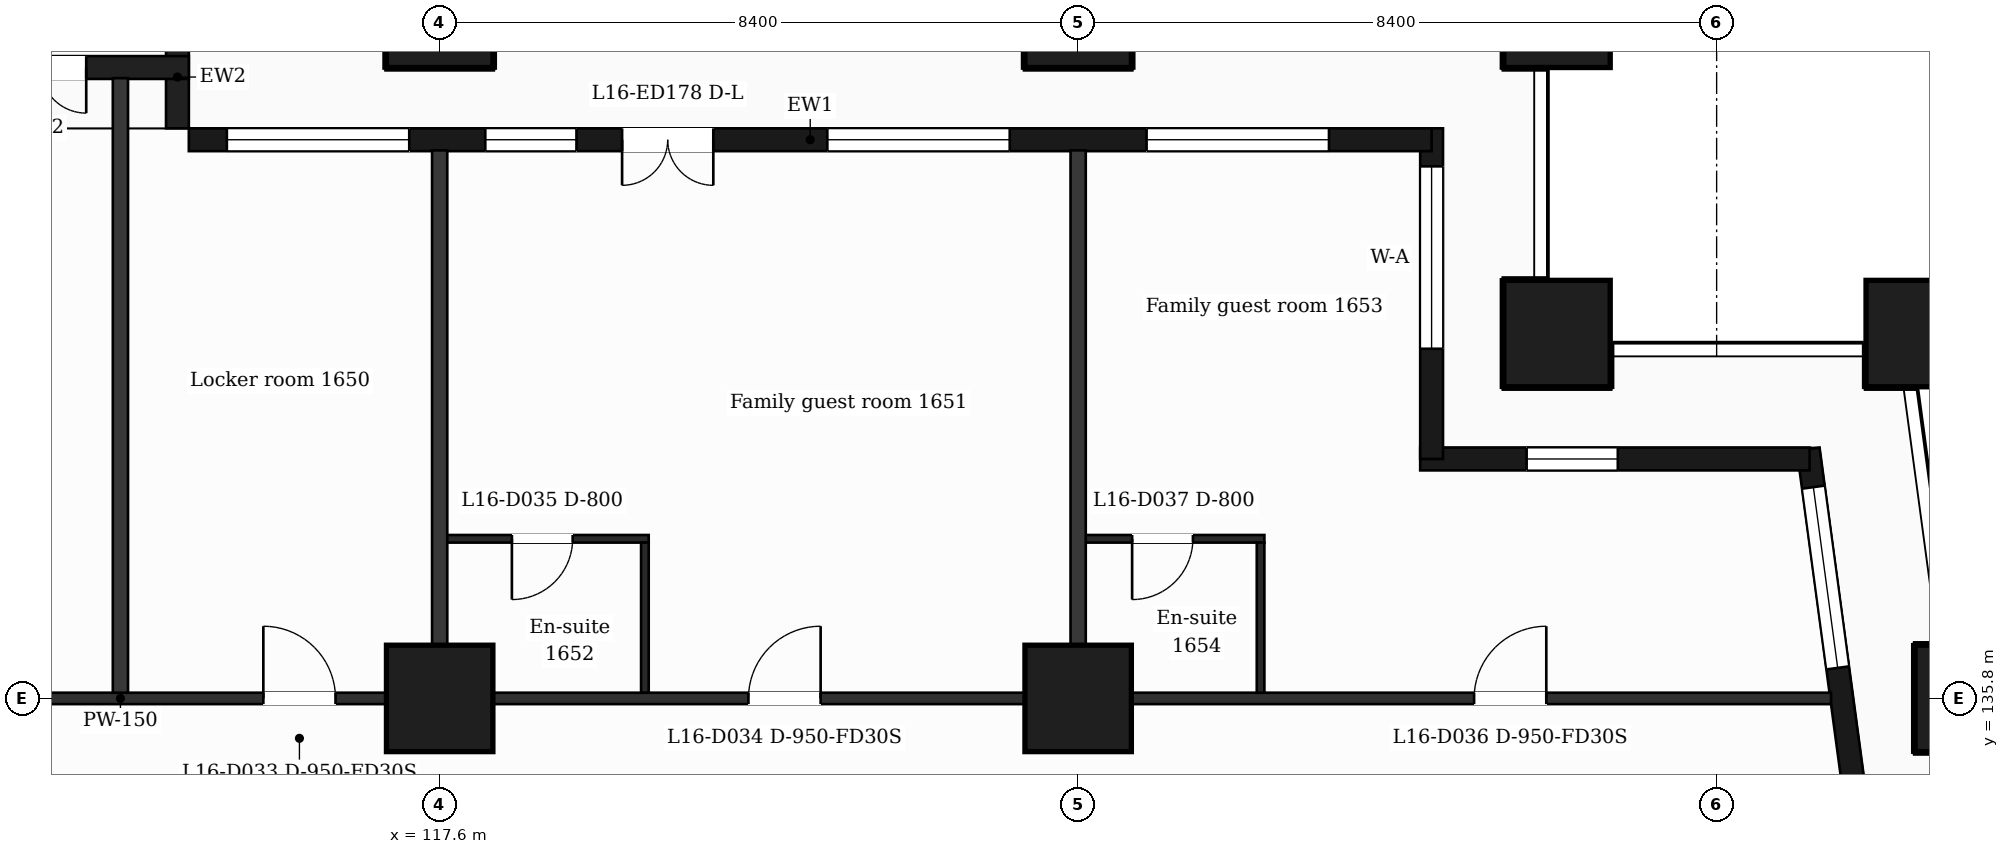
"""IFC4 building model, lengths in metres.
Left out: names, types, materials, properties, quantities, classifications, styles, units other than length and angle.
Written with IfcOpenShell. Run it as: python <this file> out.ifc"""

import sys

from ifc_helpers import new_model, si_unit, direction, frame, frame_2d, origin, origin_2d, place, context, subcontext, project, spatial, rectangle, extrude, element, fill, save


model = new_model("IFC4")
c1 = context("Model", 3, precision=1e-05, world=origin(), true_north=direction((0.0, 1.0)))
c2 = subcontext(c1, "Body", "Model", "MODEL_VIEW")
j1 = project(units=[si_unit("LENGTHUNIT", "METRE"), si_unit("PLANEANGLEUNIT", "RADIAN")], contexts=[c1])
p1 = place(None, origin())
s1 = spatial("IfcSite", under=j1, at=p1, CompositionType="ELEMENT")
p2 = place(p1, origin())
s2 = spatial("IfcBuilding", under=s1, at=p2, CompositionType="ELEMENT")
p3 = place(p2, frame((0.0, 0.0, 74.0)))
s3 = spatial("IfcBuildingStorey", under=s2, at=p3, CompositionType="ELEMENT", Elevation=74.0)
for number, where, z_axis, x_axis in (
    (1, (132.3, 140.6, 0.0), (0.0, 0.0, 1.0), (1.0, 0.0, 0.0)),
    (2, (137.065, 140.6, 0.0), (0.0, 0.0, 1.0), (1.0, 0.0, 0.0)),
    (3, (117.6, 135.8, 0.0), (0.0, 0.0, 1.0), (1.0, 0.0, 0.0)),
    (4, (126.0, 135.8, 0.0), (0.0, 0.0, 1.0), (1.0, 0.0, 0.0)),
    (5, (137.711, 135.8, 0.0), (0.0, 0.0, 1.0), (1.0, 0.0, 0.0)),
    (6, (117.6, 144.8, 0.0), (0.0, 0.0, 1.0), (1.0, 0.0, 0.0)),
    (7, (126.0, 144.8, 0.0), (0.0, 0.0, 1.0), (1.0, 0.0, 0.0)),
    (8, (132.3, 144.8, 0.0), (0.0, 0.0, 1.0), (1.0, 0.0, 0.0)),
):
    element("IfcColumn", number, at=place(p3, frame(where, z_axis=z_axis, x_axis=x_axis)), inside=s3, PredefinedType="COLUMN", context=c2, shape_type="SweptSolid", body=[
        extrude(rectangle(XDim=1.4, YDim=1.4, at=origin_2d()), origin(), (0.0, 0.0, 1.0), 3.5),
    ])
p4 = place(p3, frame((136.504, 132.4, 0.0), z_axis=(0.0, 0.0, 1.0), x_axis=(-0.133399697462, 0.99106231929, 0.0)))
e9 = element("IfcWall", 9, at=p4, inside=s3, PredefinedType="SOLIDWALL", context=c2, shape_type="SweptSolid", body=[
    extrude(rectangle(XDim=6.74, YDim=0.3, at=frame_2d((3.37, 0.0))), origin(), (0.0, 0.0, 1.0), 3.18),
])
p5 = place(p4, frame((1.115, 0.0, 0.0)))
e10 = element("IfcOpeningElement", 10, at=p5, cuts=e9, PredefinedType="OPENING", context=c2, shape_type="SweptSolid", body=[
    extrude(rectangle(XDim=1.2, YDim=2.4, at=frame_2d((0.6, 1.2))), frame((0.0, 0.16, 0.0), z_axis=(0.0, -1.0, 0.0), x_axis=(1.0, 0.0, 0.0)), (0.0, 0.0, 1.0), 0.32),
])
p6 = place(p4, frame((3.835, 0.0, 0.9)))
e11 = element("IfcOpeningElement", 11, at=p6, cuts=e9, PredefinedType="OPENING", context=c2, shape_type="SweptSolid", body=[
    extrude(rectangle(XDim=2.4, YDim=2.1, at=frame_2d((1.2, 1.05))), frame((0.0, 0.16, 0.0), z_axis=(0.0, -1.0, 0.0), x_axis=(1.0, 0.0, 0.0)), (0.0, 0.0, 1.0), 0.32),
])
p7 = place(p3, frame((135.623, 138.95, 0.0), z_axis=(0.0, 0.0, 1.0), x_axis=(-1.0, 0.0, 0.0)))
e12 = element("IfcWall", 12, at=p7, inside=s3, PredefinedType="SOLIDWALL", context=c2, shape_type="SweptSolid", body=[
    extrude(rectangle(XDim=5.123, YDim=0.3, at=frame_2d((2.561, 0.0))), origin(), (0.0, 0.0, 1.0), 3.18),
])
p8 = place(p7, frame((2.523, 0.0, 0.9)))
e13 = element("IfcOpeningElement", 13, at=p8, cuts=e12, PredefinedType="OPENING", context=c2, shape_type="SweptSolid", body=[
    extrude(rectangle(XDim=1.2, YDim=2.1, at=frame_2d((0.6, 1.05))), frame((0.0, 0.16, 0.0), z_axis=(0.0, -1.0, 0.0), x_axis=(1.0, 0.0, 0.0)), (0.0, 0.0, 1.0), 0.32),
])
p9 = place(p3, frame((130.65, 138.95, 0.0), z_axis=(0.0, 0.0, 1.0), x_axis=(0.0, 1.0, 0.0)))
e14 = element("IfcWall", 14, at=p9, inside=s3, PredefinedType="SOLIDWALL", context=c2, shape_type="SweptSolid", body=[
    extrude(rectangle(XDim=4.35, YDim=0.3, at=frame_2d((2.175, 0.0))), origin(), (0.0, 0.0, 1.0), 3.18),
])
p10 = place(p9, frame((1.45, 0.0, 0.9)))
e15 = element("IfcOpeningElement", 15, at=p10, cuts=e14, PredefinedType="OPENING", context=c2, shape_type="SweptSolid", body=[
    extrude(rectangle(XDim=2.4, YDim=2.1, at=frame_2d((1.2, 1.05))), frame((0.0, 0.16, 0.0), z_axis=(0.0, -1.0, 0.0), x_axis=(1.0, 0.0, 0.0)), (0.0, 0.0, 1.0), 0.32),
])
p11 = place(p3, frame((130.65, 143.15, 0.0), z_axis=(0.0, 0.0, 1.0), x_axis=(-1.0, 0.0, 0.0)))
e16 = element("IfcWall", 16, at=p11, inside=s3, PredefinedType="SOLIDWALL", context=c2, shape_type="SweptSolid", body=[
    extrude(rectangle(XDim=16.35, YDim=0.3, at=frame_2d((8.175, 0.0))), origin(), (0.0, 0.0, 1.0), 3.18),
])
p12 = place(p11, frame((1.35, 0.0, 0.9)))
e17 = element("IfcOpeningElement", 17, at=p12, cuts=e16, PredefinedType="OPENING", context=c2, shape_type="SweptSolid", body=[
    extrude(rectangle(XDim=2.4, YDim=2.1, at=frame_2d((1.2, 1.05))), frame((0.0, 0.16, 0.0), z_axis=(0.0, -1.0, 0.0), x_axis=(1.0, 0.0, 0.0)), (0.0, 0.0, 1.0), 0.32),
])
p13 = place(p11, frame((5.55, 0.0, 0.9)))
e18 = element("IfcOpeningElement", 18, at=p13, cuts=e16, PredefinedType="OPENING", context=c2, shape_type="SweptSolid", body=[
    extrude(rectangle(XDim=2.4, YDim=2.1, at=frame_2d((1.2, 1.05))), frame((0.0, 0.16, 0.0), z_axis=(0.0, -1.0, 0.0), x_axis=(1.0, 0.0, 0.0)), (0.0, 0.0, 1.0), 0.32),
])
p14 = place(p11, frame((9.45, 0.0, 0.0)))
e19 = element("IfcOpeningElement", 19, at=p14, cuts=e16, PredefinedType="OPENING", context=c2, shape_type="SweptSolid", body=[
    extrude(rectangle(XDim=1.2, YDim=2.4, at=frame_2d((0.6, 1.2))), frame((0.0, 0.16, 0.0), z_axis=(0.0, -1.0, 0.0), x_axis=(1.0, 0.0, 0.0)), (0.0, 0.0, 1.0), 0.32),
])
p15 = place(p11, frame((11.25, 0.0, 0.9)))
e20 = element("IfcOpeningElement", 20, at=p15, cuts=e16, PredefinedType="OPENING", context=c2, shape_type="SweptSolid", body=[
    extrude(rectangle(XDim=1.2, YDim=2.1, at=frame_2d((0.6, 1.05))), frame((0.0, 0.16, 0.0), z_axis=(0.0, -1.0, 0.0), x_axis=(1.0, 0.0, 0.0)), (0.0, 0.0, 1.0), 0.32),
])
p16 = place(p11, frame((13.45, 0.0, 0.9)))
e21 = element("IfcOpeningElement", 21, at=p16, cuts=e16, PredefinedType="OPENING", context=c2, shape_type="SweptSolid", body=[
    extrude(rectangle(XDim=2.4, YDim=2.1, at=frame_2d((1.2, 1.05))), frame((0.0, 0.16, 0.0), z_axis=(0.0, -1.0, 0.0), x_axis=(1.0, 0.0, 0.0)), (0.0, 0.0, 1.0), 0.32),
])
p17 = place(p3, frame((114.15, 143.3, 0.0), z_axis=(0.0, 0.0, 1.0), x_axis=(0.0, 1.0, 0.0)))
e22 = element("IfcWall", 22, at=p17, inside=s3, PredefinedType="SOLIDWALL", context=c2, shape_type="SweptSolid", body=[
    extrude(rectangle(XDim=1.35, YDim=0.3, at=frame_2d((0.675, 0.0))), origin(), (0.0, 0.0, 1.0), 3.18),
])
p18 = place(p3, frame((114.3, 144.1, 0.0), z_axis=(0.0, 0.0, 1.0), x_axis=(-1.0, 0.0, 0.0)))
e23 = element("IfcWall", 23, at=p18, inside=s3, PredefinedType="SOLIDWALL", context=c2, shape_type="SweptSolid", body=[
    extrude(rectangle(XDim=3.9, YDim=0.3, at=frame_2d((1.95, 0.0))), origin(), (0.0, 0.0, 1.0), 3.18),
])
p19 = place(p18, frame((1.35, 0.0, 0.0)))
e24 = element("IfcOpeningElement", 24, at=p19, cuts=e23, PredefinedType="OPENING", context=c2, shape_type="SweptSolid", body=[
    extrude(rectangle(XDim=1.2, YDim=2.4, at=frame_2d((0.6, 1.2))), frame((0.0, 0.16, 0.0), z_axis=(0.0, -1.0, 0.0), x_axis=(1.0, 0.0, 0.0)), (0.0, 0.0, 1.0), 0.32),
])
p20 = place(p3, frame((90.895, 135.8, 0.0), z_axis=(0.0, 0.0, 1.0), x_axis=(1.0, 0.0, 0.0)))
e25 = element("IfcWall", 25, at=p20, inside=s3, PredefinedType="PARTITIONING", context=c2, shape_type="SweptSolid", body=[
    extrude(rectangle(XDim=45.011, YDim=0.15, at=frame_2d((22.505, 0.0))), origin(), (0.0, 0.0, 1.0), 3.18),
])
p21 = place(p20, frame((7.068, 0.0, 0.0)))
e26 = element("IfcOpeningElement", 26, at=p21, cuts=e25, PredefinedType="OPENING", context=c2, shape_type="SweptSolid", body=[
    extrude(rectangle(XDim=0.95, YDim=2.1, at=frame_2d((0.475, 1.05))), frame((0.0, 0.085, 0.0), z_axis=(0.0, -1.0, 0.0), x_axis=(1.0, 0.0, 0.0)), (0.0, 0.0, 1.0), 0.17),
])
p22 = place(p20, frame((10.892, 0.0, 0.0)))
e27 = element("IfcOpeningElement", 27, at=p22, cuts=e25, PredefinedType="OPENING", context=c2, shape_type="SweptSolid", body=[
    extrude(rectangle(XDim=0.95, YDim=2.1, at=frame_2d((0.475, 1.05))), frame((0.0, 0.085, 0.0), z_axis=(0.0, -1.0, 0.0), x_axis=(1.0, 0.0, 0.0)), (0.0, 0.0, 1.0), 0.17),
])
p23 = place(p20, frame((19.465, 0.0, 0.0)))
e28 = element("IfcOpeningElement", 28, at=p23, cuts=e25, PredefinedType="OPENING", context=c2, shape_type="SweptSolid", body=[
    extrude(rectangle(XDim=0.95, YDim=2.1, at=frame_2d((0.475, 1.05))), frame((0.0, 0.085, 0.0), z_axis=(0.0, -1.0, 0.0), x_axis=(1.0, 0.0, 0.0)), (0.0, 0.0, 1.0), 0.17),
])
p24 = place(p20, frame((24.385, 0.0, 0.0)))
e29 = element("IfcOpeningElement", 29, at=p24, cuts=e25, PredefinedType="OPENING", context=c2, shape_type="SweptSolid", body=[
    extrude(rectangle(XDim=0.95, YDim=2.1, at=frame_2d((0.475, 1.05))), frame((0.0, 0.085, 0.0), z_axis=(0.0, -1.0, 0.0), x_axis=(1.0, 0.0, 0.0)), (0.0, 0.0, 1.0), 0.17),
])
p25 = place(p20, frame((30.767, 0.0, 0.0)))
e30 = element("IfcOpeningElement", 30, at=p25, cuts=e25, PredefinedType="OPENING", context=c2, shape_type="SweptSolid", body=[
    extrude(rectangle(XDim=0.95, YDim=2.1, at=frame_2d((0.475, 1.05))), frame((0.0, 0.085, 0.0), z_axis=(0.0, -1.0, 0.0), x_axis=(1.0, 0.0, 0.0)), (0.0, 0.0, 1.0), 0.17),
])
p26 = place(p20, frame((40.314, 0.0, 0.0)))
e31 = element("IfcOpeningElement", 31, at=p26, cuts=e25, PredefinedType="OPENING", context=c2, shape_type="SweptSolid", body=[
    extrude(rectangle(XDim=0.95, YDim=2.1, at=frame_2d((0.475, 1.05))), frame((0.0, 0.085, 0.0), z_axis=(0.0, -1.0, 0.0), x_axis=(1.0, 0.0, 0.0)), (0.0, 0.0, 1.0), 0.17),
])
p27 = place(p3, frame((117.6, 137.9, 0.0), z_axis=(0.0, 0.0, 1.0), x_axis=(1.0, 0.0, 0.0)))
e32 = element("IfcWall", 32, at=p27, inside=s3, PredefinedType="PARTITIONING", context=c2, shape_type="SweptSolid", body=[
    extrude(rectangle(XDim=2.75, YDim=0.1, at=frame_2d((1.375, 0.0))), origin(), (0.0, 0.0, 1.0), 3.18),
])
p28 = place(p27, frame((0.95, 0.0, 0.0)))
e33 = element("IfcOpeningElement", 33, at=p28, cuts=e32, PredefinedType="OPENING", context=c2, shape_type="SweptSolid", body=[
    extrude(rectangle(XDim=0.8, YDim=2.1, at=frame_2d((0.4, 1.05))), frame((0.0, 0.06, 0.0), z_axis=(0.0, -1.0, 0.0), x_axis=(1.0, 0.0, 0.0)), (0.0, 0.0, 1.0), 0.12),
])
p29 = place(p3, frame((126.0, 137.9, 0.0), z_axis=(0.0, 0.0, 1.0), x_axis=(1.0, 0.0, 0.0)))
e34 = element("IfcWall", 34, at=p29, inside=s3, PredefinedType="PARTITIONING", context=c2, shape_type="SweptSolid", body=[
    extrude(rectangle(XDim=2.45, YDim=0.1, at=frame_2d((1.225, 0.0))), origin(), (0.0, 0.0, 1.0), 3.18),
])
p30 = place(p29, frame((0.71, 0.0, 0.0)))
e35 = element("IfcOpeningElement", 35, at=p30, cuts=e34, PredefinedType="OPENING", context=c2, shape_type="SweptSolid", body=[
    extrude(rectangle(XDim=0.8, YDim=2.1, at=frame_2d((0.4, 1.05))), frame((0.0, 0.06, 0.0), z_axis=(0.0, -1.0, 0.0), x_axis=(1.0, 0.0, 0.0)), (0.0, 0.0, 1.0), 0.12),
])
p31 = place(p3, frame((113.4, 135.875, 0.0), z_axis=(0.0, 0.0, 1.0), x_axis=(0.0, 1.0, 0.0)))
e36 = element("IfcWall", 36, at=p31, inside=s3, PredefinedType="PARTITIONING", context=c2, shape_type="SweptSolid", body=[
    extrude(rectangle(XDim=8.085, YDim=0.2, at=frame_2d((4.042, 0.0))), origin(), (0.0, 0.0, 1.0), 3.18),
])
p32 = place(p3, frame((117.6, 135.875, 0.0), z_axis=(0.0, 0.0, 1.0), x_axis=(0.0, 1.0, 0.0)))
e37 = element("IfcWall", 37, at=p32, inside=s3, PredefinedType="PARTITIONING", context=c2, shape_type="SweptSolid", body=[
    extrude(rectangle(XDim=7.135, YDim=0.2, at=frame_2d((3.567, 0.0))), origin(), (0.0, 0.0, 1.0), 3.18),
])
p33 = place(p3, frame((120.3, 135.875, 0.0), z_axis=(0.0, 0.0, 1.0), x_axis=(0.0, 1.0, 0.0)))
e38 = element("IfcWall", 38, at=p33, inside=s3, PredefinedType="PARTITIONING", context=c2, shape_type="SweptSolid", body=[
    extrude(rectangle(XDim=1.975, YDim=0.1, at=frame_2d((0.988, 0.0))), origin(), (0.0, 0.0, 1.0), 3.18),
])
p34 = place(p3, frame((126.0, 135.875, 0.0), z_axis=(0.0, 0.0, 1.0), x_axis=(0.0, 1.0, 0.0)))
e39 = element("IfcWall", 39, at=p34, inside=s3, PredefinedType="PARTITIONING", context=c2, shape_type="SweptSolid", body=[
    extrude(rectangle(XDim=7.135, YDim=0.2, at=frame_2d((3.567, 0.0))), origin(), (0.0, 0.0, 1.0), 3.18),
])
p35 = place(p3, frame((128.4, 135.875, 0.0), z_axis=(0.0, 0.0, 1.0), x_axis=(0.0, 1.0, 0.0)))
e40 = element("IfcWall", 40, at=p35, inside=s3, PredefinedType="PARTITIONING", context=c2, shape_type="SweptSolid", body=[
    extrude(rectangle(XDim=1.975, YDim=0.1, at=frame_2d((0.988, 0.0))), origin(), (0.0, 0.0, 1.0), 3.18),
])
p36 = place(p6, origin())
e41 = element("IfcWindow", 41, at=p36, inside=s3, PartitioningType="SINGLE_PANEL", PredefinedType="WINDOW", context=c2, shape_type="SweptSolid", body=[
    extrude(rectangle(XDim=2.4, YDim=2.1, at=frame_2d((1.2, 1.05))), frame((0.0, 0.03, 0.0), z_axis=(0.0, -1.0, 0.0), x_axis=(1.0, 0.0, 0.0)), (0.0, 0.0, 1.0), 0.06),
])
fill(e11, e41)
p37 = place(p8, origin())
e42 = element("IfcWindow", 42, at=p37, inside=s3, PartitioningType="SINGLE_PANEL", PredefinedType="WINDOW", context=c2, shape_type="SweptSolid", body=[
    extrude(rectangle(XDim=1.2, YDim=2.1, at=frame_2d((0.6, 1.05))), frame((0.0, 0.03, 0.0), z_axis=(0.0, -1.0, 0.0), x_axis=(1.0, 0.0, 0.0)), (0.0, 0.0, 1.0), 0.06),
])
fill(e13, e42)
p38 = place(p10, origin())
e43 = element("IfcWindow", 43, at=p38, inside=s3, PartitioningType="SINGLE_PANEL", PredefinedType="WINDOW", context=c2, shape_type="SweptSolid", body=[
    extrude(rectangle(XDim=2.4, YDim=2.1, at=frame_2d((1.2, 1.05))), frame((0.0, 0.03, 0.0), z_axis=(0.0, -1.0, 0.0), x_axis=(1.0, 0.0, 0.0)), (0.0, 0.0, 1.0), 0.06),
])
fill(e15, e43)
p39 = place(p12, origin())
e44 = element("IfcWindow", 44, at=p39, inside=s3, PartitioningType="SINGLE_PANEL", PredefinedType="WINDOW", context=c2, shape_type="SweptSolid", body=[
    extrude(rectangle(XDim=2.4, YDim=2.1, at=frame_2d((1.2, 1.05))), frame((0.0, 0.03, 0.0), z_axis=(0.0, -1.0, 0.0), x_axis=(1.0, 0.0, 0.0)), (0.0, 0.0, 1.0), 0.06),
])
fill(e17, e44)
p40 = place(p13, origin())
e45 = element("IfcWindow", 45, at=p40, inside=s3, PartitioningType="SINGLE_PANEL", PredefinedType="WINDOW", context=c2, shape_type="SweptSolid", body=[
    extrude(rectangle(XDim=2.4, YDim=2.1, at=frame_2d((1.2, 1.05))), frame((0.0, 0.03, 0.0), z_axis=(0.0, -1.0, 0.0), x_axis=(1.0, 0.0, 0.0)), (0.0, 0.0, 1.0), 0.06),
])
fill(e18, e45)
p41 = place(p14, origin())
e46 = element("IfcDoor", 46, at=p41, inside=s3, OperationType="DOUBLE_DOOR_SINGLE_SWING", PredefinedType="DOOR", context=c2, shape_type="SweptSolid", body=[
    extrude(rectangle(XDim=1.2, YDim=2.4, at=frame_2d((0.6, 1.2))), frame((0.0, 0.025, 0.0), z_axis=(0.0, -1.0, 0.0), x_axis=(1.0, 0.0, 0.0)), (0.0, 0.0, 1.0), 0.05),
])
fill(e19, e46)
p42 = place(p15, origin())
e47 = element("IfcWindow", 47, at=p42, inside=s3, PartitioningType="SINGLE_PANEL", PredefinedType="WINDOW", context=c2, shape_type="SweptSolid", body=[
    extrude(rectangle(XDim=1.2, YDim=2.1, at=frame_2d((0.6, 1.05))), frame((0.0, 0.03, 0.0), z_axis=(0.0, -1.0, 0.0), x_axis=(1.0, 0.0, 0.0)), (0.0, 0.0, 1.0), 0.06),
])
fill(e20, e47)
p43 = place(p16, origin())
e48 = element("IfcWindow", 48, at=p43, inside=s3, PartitioningType="SINGLE_PANEL", PredefinedType="WINDOW", context=c2, shape_type="SweptSolid", body=[
    extrude(rectangle(XDim=2.4, YDim=2.1, at=frame_2d((1.2, 1.05))), frame((0.0, 0.03, 0.0), z_axis=(0.0, -1.0, 0.0), x_axis=(1.0, 0.0, 0.0)), (0.0, 0.0, 1.0), 0.06),
])
fill(e21, e48)
p44 = place(p19, origin())
e49 = element("IfcDoor", 49, at=p44, inside=s3, OperationType="DOUBLE_DOOR_SINGLE_SWING", PredefinedType="DOOR", context=c2, shape_type="SweptSolid", body=[
    extrude(rectangle(XDim=1.2, YDim=2.4, at=frame_2d((0.6, 1.2))), frame((0.0, 0.025, 0.0), z_axis=(0.0, -1.0, 0.0), x_axis=(1.0, 0.0, 0.0)), (0.0, 0.0, 1.0), 0.05),
])
fill(e24, e49)
p45 = place(p24, origin())
e50 = element("IfcDoor", 50, at=p45, inside=s3, OperationType="SINGLE_SWING_LEFT", PredefinedType="DOOR", context=c2, shape_type="SweptSolid", body=[
    extrude(rectangle(XDim=0.95, YDim=2.1, at=frame_2d((0.475, 1.05))), frame((0.0, 0.025, 0.0), z_axis=(0.0, -1.0, 0.0), x_axis=(1.0, 0.0, 0.0)), (0.0, 0.0, 1.0), 0.05),
])
fill(e29, e50)
p46 = place(p25, origin())
e51 = element("IfcDoor", 51, at=p46, inside=s3, OperationType="SINGLE_SWING_RIGHT", PredefinedType="DOOR", context=c2, shape_type="SweptSolid", body=[
    extrude(rectangle(XDim=0.95, YDim=2.1, at=frame_2d((0.475, 1.05))), frame((0.0, 0.025, 0.0), z_axis=(0.0, -1.0, 0.0), x_axis=(1.0, 0.0, 0.0)), (0.0, 0.0, 1.0), 0.05),
])
fill(e30, e51)
p47 = place(p28, origin())
e52 = element("IfcDoor", 52, at=p47, inside=s3, OperationType="SINGLE_SWING_LEFT", PredefinedType="DOOR", context=c2, shape_type="SweptSolid", body=[
    extrude(rectangle(XDim=0.8, YDim=2.1, at=frame_2d((0.4, 1.05))), frame((0.0, 0.025, 0.0), z_axis=(0.0, -1.0, 0.0), x_axis=(1.0, 0.0, 0.0)), (0.0, 0.0, 1.0), 0.05),
])
fill(e33, e52)
p48 = place(p26, origin())
e53 = element("IfcDoor", 53, at=p48, inside=s3, OperationType="SINGLE_SWING_RIGHT", PredefinedType="DOOR", context=c2, shape_type="SweptSolid", body=[
    extrude(rectangle(XDim=0.95, YDim=2.1, at=frame_2d((0.475, 1.05))), frame((0.0, 0.025, 0.0), z_axis=(0.0, -1.0, 0.0), x_axis=(1.0, 0.0, 0.0)), (0.0, 0.0, 1.0), 0.05),
])
fill(e31, e53)
p49 = place(p30, origin())
e54 = element("IfcDoor", 54, at=p49, inside=s3, OperationType="SINGLE_SWING_LEFT", PredefinedType="DOOR", context=c2, shape_type="SweptSolid", body=[
    extrude(rectangle(XDim=0.8, YDim=2.1, at=frame_2d((0.4, 1.05))), frame((0.0, 0.025, 0.0), z_axis=(0.0, -1.0, 0.0), x_axis=(1.0, 0.0, 0.0)), (0.0, 0.0, 1.0), 0.05),
])
fill(e35, e54)
save(model, sys.argv[1])
